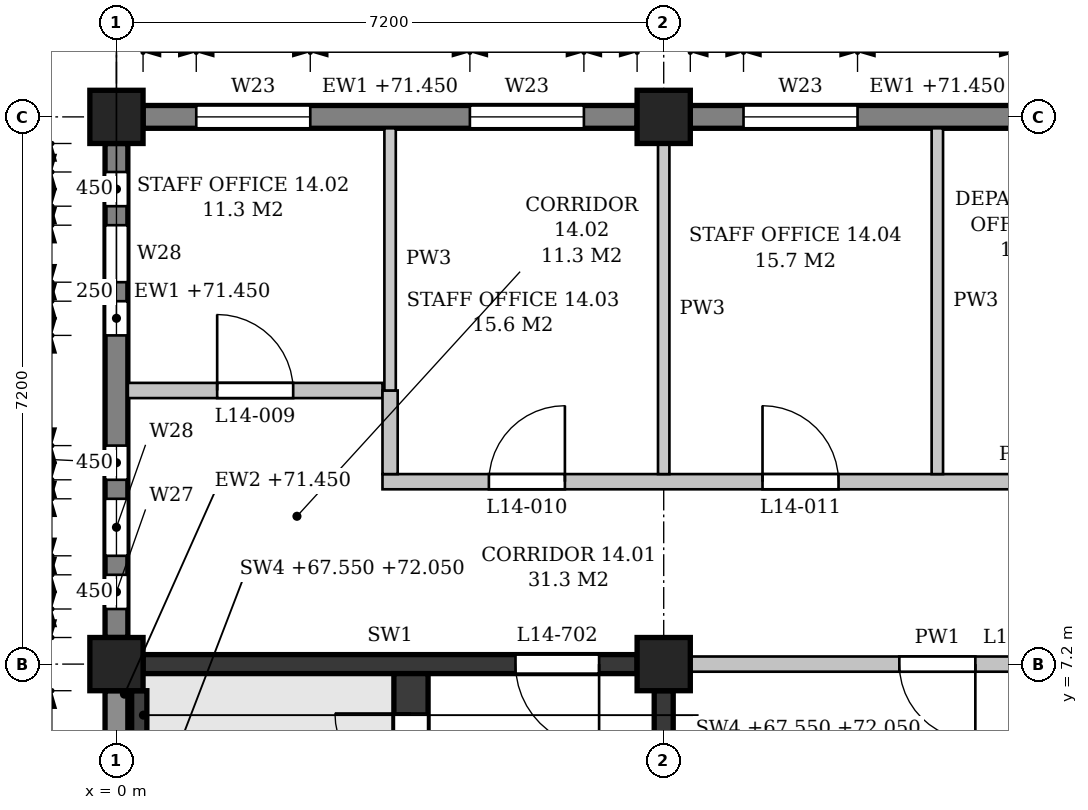
"""IFC4 building model, lengths in metres.
Left out: names, types, materials, properties, quantities, classifications, styles, units other than length and angle.
Written with IfcOpenShell. Run it as: python <this file> out.ifc"""

import sys

from ifc_helpers import new_model, si_unit, direction, frame, frame_2d, origin, origin_2d, place, context, subcontext, project, spatial, polyline, rectangle, outline, extrude, element, fill, save


model = new_model("IFC4")
c1 = context("Model", 3, precision=1e-05, world=origin(), true_north=direction((0.0, 1.0)))
c2 = subcontext(c1, "Body", "Model", "MODEL_VIEW")
j1 = project(units=[si_unit("LENGTHUNIT", "METRE"), si_unit("PLANEANGLEUNIT", "RADIAN")], contexts=[c1])
p1 = place(None, origin())
s1 = spatial("IfcSite", under=j1, at=p1, CompositionType="ELEMENT")
p2 = place(p1, origin())
s2 = spatial("IfcBuilding", under=s1, at=p2, CompositionType="ELEMENT")
p3 = place(p2, frame((0.0, 0.0, 67.8)))
s3 = spatial("IfcBuildingStorey", under=s2, at=p3, CompositionType="ELEMENT", Elevation=67.8)
for number, where, z_axis, x_axis in (
    (1, (0.0, 7.2, 0.0), (0.0, 0.0, 1.0), (1.0, 0.0, 0.0)),
    (2, (0.0, 14.4, 0.0), (0.0, 0.0, 1.0), (1.0, 0.0, 0.0)),
    (3, (7.2, 7.2, 0.0), (0.0, 0.0, 1.0), (1.0, 0.0, 0.0)),
    (4, (7.2, 14.4, 0.0), (0.0, 0.0, 1.0), (1.0, 0.0, 0.0)),
):
    element("IfcColumn", number, at=place(p3, frame(where, z_axis=z_axis, x_axis=x_axis)), inside=s3, PredefinedType="COLUMN", context=c2, shape_type="SweptSolid", body=[
        extrude(rectangle(XDim=0.7, YDim=0.7, at=origin_2d()), origin(), (0.0, 0.0, 1.0), 4.5),
    ])
p4 = place(p3, frame((0.0, 0.35, 0.0), z_axis=(0.0, 0.0, 1.0), x_axis=(0.0, 1.0, 0.0)))
e5 = element("IfcWall", 5, at=p4, inside=s3, PredefinedType="STANDARD", context=c2, shape_type="SweptSolid", body=[
    extrude(rectangle(XDim=6.5, YDim=0.3, at=frame_2d((3.25, 0.0))), origin(), (0.0, 0.0, 1.0), 3.65),
])
p5 = place(p4, frame((1.0, 0.0, 0.9)))
e6 = element("IfcOpeningElement", 6, at=p5, cuts=e5, PredefinedType="OPENING", context=c2, shape_type="SweptSolid", body=[
    extrude(outline(polyline([(0.0, 0.0), (0.9, 0.0), (0.9, 2.25), (0.45, 2.7), (0.0, 2.25), (0.0, 0.0)])), frame((0.0, 0.16, 0.0), z_axis=(0.0, -1.0, 0.0), x_axis=(1.0, 0.0, 0.0)), (0.0, 0.0, 1.0), 0.32),
])
p6 = place(p4, frame((4.6, 0.0, 0.9)))
e7 = element("IfcOpeningElement", 7, at=p6, cuts=e5, PredefinedType="OPENING", context=c2, shape_type="SweptSolid", body=[
    extrude(outline(polyline([(0.0, 0.0), (0.9, 0.0), (0.9, 2.25), (0.45, 2.7), (0.0, 2.25), (0.0, 0.0)])), frame((0.0, 0.16, 0.0), z_axis=(0.0, -1.0, 0.0), x_axis=(1.0, 0.0, 0.0)), (0.0, 0.0, 1.0), 0.32),
])
p7 = place(p3, frame((0.0, 7.55, 0.0), z_axis=(0.0, 0.0, 1.0), x_axis=(0.0, 1.0, 0.0)))
e8 = element("IfcWall", 8, at=p7, inside=s3, PredefinedType="STANDARD", context=c2, shape_type="SweptSolid", body=[
    extrude(rectangle(XDim=6.5, YDim=0.3, at=frame_2d((3.25, 0.0))), origin(), (0.0, 0.0, 1.0), 3.65),
])
p8 = place(p7, frame((0.375, 0.0, 1.5)))
e9 = element("IfcOpeningElement", 9, at=p8, cuts=e8, PredefinedType="OPENING", context=c2, shape_type="SweptSolid", body=[
    extrude(outline(polyline([(0.0, 0.0), (0.45, 0.0), (0.45, 1.85), (0.225, 2.1), (0.0, 1.85), (0.0, 0.0)])), frame((0.0, 0.16, 0.0), z_axis=(0.0, -1.0, 0.0), x_axis=(1.0, 0.0, 0.0)), (0.0, 0.0, 1.0), 0.32),
])
p9 = place(p7, frame((1.075, 0.0, 0.9)))
e10 = element("IfcOpeningElement", 10, at=p9, cuts=e8, PredefinedType="OPENING", context=c2, shape_type="SweptSolid", body=[
    extrude(outline(polyline([(0.0, 0.0), (0.75, 0.0), (0.75, 2.25), (0.375, 2.7), (0.0, 2.25), (0.0, 0.0)])), frame((0.0, 0.16, 0.0), z_axis=(0.0, -1.0, 0.0), x_axis=(1.0, 0.0, 0.0)), (0.0, 0.0, 1.0), 0.32),
])
p10 = place(p7, frame((2.075, 0.0, 1.5)))
e11 = element("IfcOpeningElement", 11, at=p10, cuts=e8, PredefinedType="OPENING", context=c2, shape_type="SweptSolid", body=[
    extrude(outline(polyline([(0.0, 0.0), (0.45, 0.0), (0.45, 1.85), (0.225, 2.1), (0.0, 1.85), (0.0, 0.0)])), frame((0.0, 0.16, 0.0), z_axis=(0.0, -1.0, 0.0), x_axis=(1.0, 0.0, 0.0)), (0.0, 0.0, 1.0), 0.32),
])
p11 = place(p7, frame((3.975, 0.0, 1.5)))
e12 = element("IfcOpeningElement", 12, at=p11, cuts=e8, PredefinedType="OPENING", context=c2, shape_type="SweptSolid", body=[
    extrude(outline(polyline([(0.0, 0.0), (0.45, 0.0), (0.45, 1.85), (0.225, 2.1), (0.0, 1.85), (0.0, 0.0)])), frame((0.0, 0.16, 0.0), z_axis=(0.0, -1.0, 0.0), x_axis=(1.0, 0.0, 0.0)), (0.0, 0.0, 1.0), 0.32),
])
p12 = place(p7, frame((4.675, 0.0, 0.9)))
e13 = element("IfcOpeningElement", 13, at=p12, cuts=e8, PredefinedType="OPENING", context=c2, shape_type="SweptSolid", body=[
    extrude(outline(polyline([(0.0, 0.0), (0.75, 0.0), (0.75, 2.25), (0.375, 2.7), (0.0, 2.25), (0.0, 0.0)])), frame((0.0, 0.16, 0.0), z_axis=(0.0, -1.0, 0.0), x_axis=(1.0, 0.0, 0.0)), (0.0, 0.0, 1.0), 0.32),
])
p13 = place(p7, frame((5.675, 0.0, 1.5)))
e14 = element("IfcOpeningElement", 14, at=p13, cuts=e8, PredefinedType="OPENING", context=c2, shape_type="SweptSolid", body=[
    extrude(outline(polyline([(0.0, 0.0), (0.45, 0.0), (0.45, 1.85), (0.225, 2.1), (0.0, 1.85), (0.0, 0.0)])), frame((0.0, 0.16, 0.0), z_axis=(0.0, -1.0, 0.0), x_axis=(1.0, 0.0, 0.0)), (0.0, 0.0, 1.0), 0.32),
])
p14 = place(p3, frame((14.05, 14.4, 0.0), z_axis=(0.0, 0.0, 1.0), x_axis=(-1.0, 0.0, 0.0)))
e15 = element("IfcWall", 15, at=p14, inside=s3, PredefinedType="STANDARD", context=c2, shape_type="SweptSolid", body=[
    extrude(rectangle(XDim=6.5, YDim=0.3, at=frame_2d((3.25, 0.0))), origin(), (0.0, 0.0, 1.0), 3.65),
])
p15 = place(p14, frame((0.7, 0.0, 0.9)))
e16 = element("IfcOpeningElement", 16, at=p15, cuts=e15, PredefinedType="OPENING", context=c2, shape_type="SweptSolid", body=[
    extrude(outline(polyline([(0.0, 0.0), (1.5, 0.0), (1.5, 1.95), (0.75, 2.7), (0.0, 1.95), (0.0, 0.0)])), frame((0.0, 0.16, 0.0), z_axis=(0.0, -1.0, 0.0), x_axis=(1.0, 0.0, 0.0)), (0.0, 0.0, 1.0), 0.32),
])
p16 = place(p14, frame((4.3, 0.0, 0.9)))
e17 = element("IfcOpeningElement", 17, at=p16, cuts=e15, PredefinedType="OPENING", context=c2, shape_type="SweptSolid", body=[
    extrude(outline(polyline([(0.0, 0.0), (1.5, 0.0), (1.5, 1.95), (0.75, 2.7), (0.0, 1.95), (0.0, 0.0)])), frame((0.0, 0.16, 0.0), z_axis=(0.0, -1.0, 0.0), x_axis=(1.0, 0.0, 0.0)), (0.0, 0.0, 1.0), 0.32),
])
p17 = place(p3, frame((6.85, 14.4, 0.0), z_axis=(0.0, 0.0, 1.0), x_axis=(-1.0, 0.0, 0.0)))
e18 = element("IfcWall", 18, at=p17, inside=s3, PredefinedType="STANDARD", context=c2, shape_type="SweptSolid", body=[
    extrude(rectangle(XDim=6.5, YDim=0.3, at=frame_2d((3.25, 0.0))), origin(), (0.0, 0.0, 1.0), 3.65),
])
p18 = place(p17, frame((0.7, 0.0, 0.9)))
e19 = element("IfcOpeningElement", 19, at=p18, cuts=e18, PredefinedType="OPENING", context=c2, shape_type="SweptSolid", body=[
    extrude(outline(polyline([(0.0, 0.0), (1.5, 0.0), (1.5, 1.95), (0.75, 2.7), (0.0, 1.95), (0.0, 0.0)])), frame((0.0, 0.16, 0.0), z_axis=(0.0, -1.0, 0.0), x_axis=(1.0, 0.0, 0.0)), (0.0, 0.0, 1.0), 0.32),
])
p19 = place(p17, frame((4.3, 0.0, 0.9)))
e20 = element("IfcOpeningElement", 20, at=p19, cuts=e18, PredefinedType="OPENING", context=c2, shape_type="SweptSolid", body=[
    extrude(outline(polyline([(0.0, 0.0), (1.5, 0.0), (1.5, 1.95), (0.75, 2.7), (0.0, 1.95), (0.0, 0.0)])), frame((0.0, 0.16, 0.0), z_axis=(0.0, -1.0, 0.0), x_axis=(1.0, 0.0, 0.0)), (0.0, 0.0, 1.0), 0.32),
])
p20 = place(p3, frame((0.35, 7.2, 0.0), z_axis=(0.0, 0.0, 1.0), x_axis=(1.0, 0.0, 0.0)))
e21 = element("IfcWall", 21, at=p20, inside=s3, PredefinedType="SHEAR", context=c2, shape_type="SweptSolid", body=[
    extrude(rectangle(XDim=6.5, YDim=0.25, at=frame_2d((3.25, 0.0))), origin(), (0.0, 0.0, 1.0), 3.6),
])
p21 = place(p20, frame((4.9, 0.0, 0.0)))
e22 = element("IfcOpeningElement", 22, at=p21, cuts=e21, PredefinedType="OPENING", context=c2, shape_type="SweptSolid", body=[
    extrude(rectangle(XDim=1.1, YDim=2.1, at=frame_2d((0.55, 1.05))), frame((0.0, 0.135, 0.0), z_axis=(0.0, -1.0, 0.0), x_axis=(1.0, 0.0, 0.0)), (0.0, 0.0, 1.0), 0.27),
])
p22 = place(p3, frame((7.2, 0.35, 0.0), z_axis=(0.0, 0.0, 1.0), x_axis=(0.0, 1.0, 0.0)))
e23 = element("IfcWall", 23, at=p22, inside=s3, PredefinedType="SHEAR", context=c2, shape_type="SweptSolid", body=[
    extrude(rectangle(XDim=6.5, YDim=0.25, at=frame_2d((3.25, 0.0))), origin(), (0.0, 0.0, 1.0), 3.6),
])
p23 = place(p3, frame((0.3, 5.85, -0.25), z_axis=(0.0, 0.0, 1.0), x_axis=(0.0, 1.0, 0.0)))
e24 = element("IfcWall", 24, at=p23, inside=s3, PredefinedType="SHEAR", context=c2, shape_type="SweptSolid", body=[
    extrude(rectangle(XDim=1.0, YDim=0.2, at=frame_2d((0.5, 0.0))), origin(), (0.0, 0.0, 1.0), 4.5),
])
p24 = place(p3, frame((3.875, 0.15, 0.0), z_axis=(0.0, 0.0, 1.0), x_axis=(0.0, 1.0, 0.0)))
e25 = element("IfcWall", 25, at=p24, inside=s3, PredefinedType="SHEAR", context=c2, shape_type="SweptSolid", body=[
    extrude(rectangle(XDim=6.925, YDim=0.45, at=frame_2d((3.462, 0.0))), origin(), (0.0, 0.0, 1.0), 4.25),
])
p25 = place(p24, frame((5.4, 0.0, 0.0)))
e26 = element("IfcOpeningElement", 26, at=p25, cuts=e25, PredefinedType="OPENING", context=c2, shape_type="SweptSolid", body=[
    extrude(rectangle(XDim=1.0, YDim=2.1, at=frame_2d((0.5, 1.05))), frame((0.0, 0.235, 0.0), z_axis=(0.0, -1.0, 0.0), x_axis=(1.0, 0.0, 0.0)), (0.0, 0.0, 1.0), 0.47),
])
p26 = place(p3, frame((7.55, 7.2, 0.0), z_axis=(0.0, 0.0, 1.0), x_axis=(1.0, 0.0, 0.0)))
e27 = element("IfcWall", 27, at=p26, inside=s3, PredefinedType="PARTITIONING", context=c2, shape_type="SweptSolid", body=[
    extrude(rectangle(XDim=6.5, YDim=0.2, at=frame_2d((3.25, 0.0))), origin(), (0.0, 0.0, 1.0), 3.6),
])
p27 = place(p26, frame((2.75, 0.0, 0.0)))
e28 = element("IfcOpeningElement", 28, at=p27, cuts=e27, PredefinedType="OPENING", context=c2, shape_type="SweptSolid", body=[
    extrude(rectangle(XDim=1.0, YDim=2.1, at=frame_2d((0.5, 1.05))), frame((0.0, 0.11, 0.0), z_axis=(0.0, -1.0, 0.0), x_axis=(1.0, 0.0, 0.0)), (0.0, 0.0, 1.0), 0.22),
])
p28 = place(p3, frame((3.5, 9.6, 0.0), z_axis=(0.0, 0.0, 1.0), x_axis=(1.0, 0.0, 0.0)))
e29 = element("IfcWall", 29, at=p28, inside=s3, PredefinedType="PARTITIONING", context=c2, shape_type="SweptSolid", body=[
    extrude(outline(polyline([(0.0, 0.0), (18.0, 0.0), (18.0, 3.6), (17.9, 3.6), (17.9, 4.25), (11.1, 4.25), (11.1, 3.6), (10.7, 3.6), (10.7, 4.25), (3.9, 4.25), (3.9, 3.6), (3.5, 3.6), (3.5, 4.25), (0.0, 4.25), (0.0, 0.0)])), frame((0.0, 0.1, 0.0), z_axis=(0.0, -1.0, 0.0), x_axis=(1.0, 0.0, 0.0)), (0.0, 0.0, 1.0), 0.2),
])
p29 = place(p28, frame((15.75, 0.0, 0.0)))
e30 = element("IfcOpeningElement", 30, at=p29, cuts=e29, PredefinedType="OPENING", context=c2, shape_type="SweptSolid", body=[
    extrude(rectangle(XDim=1.0, YDim=2.1, at=frame_2d((0.5, 1.05))), frame((0.0, 0.11, 0.0), z_axis=(0.0, -1.0, 0.0), x_axis=(1.0, 0.0, 0.0)), (0.0, 0.0, 1.0), 0.22),
])
p30 = place(p28, frame((1.4, 0.0, 0.0)))
e31 = element("IfcOpeningElement", 31, at=p30, cuts=e29, PredefinedType="OPENING", context=c2, shape_type="SweptSolid", body=[
    extrude(rectangle(XDim=1.0, YDim=2.1, at=frame_2d((0.5, 1.05))), frame((0.0, 0.11, 0.0), z_axis=(0.0, -1.0, 0.0), x_axis=(1.0, 0.0, 0.0)), (0.0, 0.0, 1.0), 0.22),
])
p31 = place(p28, frame((5.0, 0.0, 0.0)))
e32 = element("IfcOpeningElement", 32, at=p31, cuts=e29, PredefinedType="OPENING", context=c2, shape_type="SweptSolid", body=[
    extrude(rectangle(XDim=1.0, YDim=2.1, at=frame_2d((0.5, 1.05))), frame((0.0, 0.11, 0.0), z_axis=(0.0, -1.0, 0.0), x_axis=(1.0, 0.0, 0.0)), (0.0, 0.0, 1.0), 0.22),
])
p32 = place(p28, frame((8.6, 0.0, 0.0)))
e33 = element("IfcOpeningElement", 33, at=p32, cuts=e29, PredefinedType="OPENING", context=c2, shape_type="SweptSolid", body=[
    extrude(rectangle(XDim=1.0, YDim=2.1, at=frame_2d((0.5, 1.05))), frame((0.0, 0.11, 0.0), z_axis=(0.0, -1.0, 0.0), x_axis=(1.0, 0.0, 0.0)), (0.0, 0.0, 1.0), 0.22),
])
p33 = place(p28, frame((12.2, 0.0, 0.0)))
e34 = element("IfcOpeningElement", 34, at=p33, cuts=e29, PredefinedType="OPENING", context=c2, shape_type="SweptSolid", body=[
    extrude(rectangle(XDim=1.0, YDim=2.1, at=frame_2d((0.5, 1.05))), frame((0.0, 0.11, 0.0), z_axis=(0.0, -1.0, 0.0), x_axis=(1.0, 0.0, 0.0)), (0.0, 0.0, 1.0), 0.22),
])
p34 = place(p3, frame((0.15, 10.8, 0.0), z_axis=(0.0, 0.0, 1.0), x_axis=(1.0, 0.0, 0.0)))
e35 = element("IfcWall", 35, at=p34, inside=s3, PredefinedType="PARTITIONING", context=c2, shape_type="SweptSolid", body=[
    extrude(outline(polyline([(0.0, 0.0), (3.35, 0.0), (3.35, 4.25), (0.05, 4.25), (0.05, 3.65), (0.0, 3.65), (0.0, 0.0)])), frame((0.0, 0.1, 0.0), z_axis=(0.0, -1.0, 0.0), x_axis=(1.0, 0.0, 0.0)), (0.0, 0.0, 1.0), 0.2),
])
p35 = place(p34, frame((1.175, 0.0, 0.0)))
e36 = element("IfcOpeningElement", 36, at=p35, cuts=e35, PredefinedType="OPENING", context=c2, shape_type="SweptSolid", body=[
    extrude(rectangle(XDim=1.0, YDim=2.1, at=frame_2d((0.5, 1.05))), frame((0.0, 0.11, 0.0), z_axis=(0.0, -1.0, 0.0), x_axis=(1.0, 0.0, 0.0)), (0.0, 0.0, 1.0), 0.22),
])
p36 = place(p3, frame((3.6, 9.7, 0.0), z_axis=(0.0, 0.0, 1.0), x_axis=(0.0, 1.0, 0.0)))
e37 = element("IfcWall", 37, at=p36, inside=s3, PredefinedType="PARTITIONING", context=c2, shape_type="SweptSolid", body=[
    extrude(rectangle(XDim=1.1, YDim=0.2, at=frame_2d((0.55, 0.0))), origin(), (0.0, 0.0, 1.0), 4.25),
])
p37 = place(p3, frame((3.6, 10.8, 0.0), z_axis=(0.0, 0.0, 1.0), x_axis=(0.0, 1.0, 0.0)))
e38 = element("IfcWall", 38, at=p37, inside=s3, PredefinedType="PARTITIONING", context=c2, shape_type="SweptSolid", body=[
    extrude(rectangle(XDim=3.45, YDim=0.15, at=frame_2d((1.725, 0.0))), origin(), (0.0, 0.0, 1.0), 3.6),
])
p38 = place(p3, frame((7.2, 9.7, 0.0), z_axis=(0.0, 0.0, 1.0), x_axis=(0.0, 1.0, 0.0)))
e39 = element("IfcWall", 39, at=p38, inside=s3, PredefinedType="PARTITIONING", context=c2, shape_type="SweptSolid", body=[
    extrude(rectangle(XDim=4.35, YDim=0.15, at=frame_2d((2.175, 0.0))), origin(), (0.0, 0.0, 1.0), 3.6),
])
p39 = place(p3, frame((10.8, 9.7, 0.0), z_axis=(0.0, 0.0, 1.0), x_axis=(0.0, 1.0, 0.0)))
e40 = element("IfcWall", 40, at=p39, inside=s3, PredefinedType="PARTITIONING", context=c2, shape_type="SweptSolid", body=[
    extrude(rectangle(XDim=4.55, YDim=0.15, at=frame_2d((2.275, 0.0))), origin(), (0.0, 0.0, 1.0), 3.6),
])
p40 = place(p16, origin())
e41 = element("IfcWindow", 41, at=p40, inside=s3, PartitioningType="SINGLE_PANEL", PredefinedType="WINDOW", context=c2, shape_type="SweptSolid", body=[
    extrude(outline(polyline([(0.0, 0.0), (1.5, 0.0), (1.5, 1.95), (0.75, 2.7), (0.0, 1.95), (0.0, 0.0)])), frame((0.0, 0.03, 0.0), z_axis=(0.0, -1.0, 0.0), x_axis=(1.0, 0.0, 0.0)), (0.0, 0.0, 1.0), 0.06),
])
fill(e17, e41)
p41 = place(p18, origin())
e42 = element("IfcWindow", 42, at=p41, inside=s3, PartitioningType="SINGLE_PANEL", PredefinedType="WINDOW", context=c2, shape_type="SweptSolid", body=[
    extrude(outline(polyline([(0.0, 0.0), (1.5, 0.0), (1.5, 1.95), (0.75, 2.7), (0.0, 1.95), (0.0, 0.0)])), frame((0.0, 0.03, 0.0), z_axis=(0.0, -1.0, 0.0), x_axis=(1.0, 0.0, 0.0)), (0.0, 0.0, 1.0), 0.06),
])
fill(e19, e42)
p42 = place(p19, origin())
e43 = element("IfcWindow", 43, at=p42, inside=s3, PartitioningType="SINGLE_PANEL", PredefinedType="WINDOW", context=c2, shape_type="SweptSolid", body=[
    extrude(outline(polyline([(0.0, 0.0), (1.5, 0.0), (1.5, 1.95), (0.75, 2.7), (0.0, 1.95), (0.0, 0.0)])), frame((0.0, 0.03, 0.0), z_axis=(0.0, -1.0, 0.0), x_axis=(1.0, 0.0, 0.0)), (0.0, 0.0, 1.0), 0.06),
])
fill(e20, e43)
p43 = place(p8, origin())
e44 = element("IfcWindow", 44, at=p43, inside=s3, PartitioningType="SINGLE_PANEL", PredefinedType="WINDOW", context=c2, shape_type="SweptSolid", body=[
    extrude(outline(polyline([(0.0, 0.0), (0.45, 0.0), (0.45, 1.85), (0.225, 2.1), (0.0, 1.85), (0.0, 0.0)])), frame((0.0, 0.03, 0.0), z_axis=(0.0, -1.0, 0.0), x_axis=(1.0, 0.0, 0.0)), (0.0, 0.0, 1.0), 0.06),
])
fill(e9, e44)
p44 = place(p9, origin())
e45 = element("IfcWindow", 45, at=p44, inside=s3, PartitioningType="SINGLE_PANEL", PredefinedType="WINDOW", context=c2, shape_type="SweptSolid", body=[
    extrude(outline(polyline([(0.0, 0.0), (0.75, 0.0), (0.75, 2.25), (0.375, 2.7), (0.0, 2.25), (0.0, 0.0)])), frame((0.0, 0.03, 0.0), z_axis=(0.0, -1.0, 0.0), x_axis=(1.0, 0.0, 0.0)), (0.0, 0.0, 1.0), 0.06),
])
fill(e10, e45)
p45 = place(p10, origin())
e46 = element("IfcWindow", 46, at=p45, inside=s3, PartitioningType="SINGLE_PANEL", PredefinedType="WINDOW", context=c2, shape_type="SweptSolid", body=[
    extrude(outline(polyline([(0.0, 0.0), (0.45, 0.0), (0.45, 1.85), (0.225, 2.1), (0.0, 1.85), (0.0, 0.0)])), frame((0.0, 0.03, 0.0), z_axis=(0.0, -1.0, 0.0), x_axis=(1.0, 0.0, 0.0)), (0.0, 0.0, 1.0), 0.06),
])
fill(e11, e46)
p46 = place(p11, origin())
e47 = element("IfcWindow", 47, at=p46, inside=s3, PartitioningType="SINGLE_PANEL", PredefinedType="WINDOW", context=c2, shape_type="SweptSolid", body=[
    extrude(outline(polyline([(0.0, 0.0), (0.45, 0.0), (0.45, 1.85), (0.225, 2.1), (0.0, 1.85), (0.0, 0.0)])), frame((0.0, 0.03, 0.0), z_axis=(0.0, -1.0, 0.0), x_axis=(1.0, 0.0, 0.0)), (0.0, 0.0, 1.0), 0.06),
])
fill(e12, e47)
p47 = place(p12, origin())
e48 = element("IfcWindow", 48, at=p47, inside=s3, PartitioningType="SINGLE_PANEL", PredefinedType="WINDOW", context=c2, shape_type="SweptSolid", body=[
    extrude(outline(polyline([(0.0, 0.0), (0.75, 0.0), (0.75, 2.25), (0.375, 2.7), (0.0, 2.25), (0.0, 0.0)])), frame((0.0, 0.03, 0.0), z_axis=(0.0, -1.0, 0.0), x_axis=(1.0, 0.0, 0.0)), (0.0, 0.0, 1.0), 0.06),
])
fill(e13, e48)
p48 = place(p13, origin())
e49 = element("IfcWindow", 49, at=p48, inside=s3, PartitioningType="SINGLE_PANEL", PredefinedType="WINDOW", context=c2, shape_type="SweptSolid", body=[
    extrude(outline(polyline([(0.0, 0.0), (0.45, 0.0), (0.45, 1.85), (0.225, 2.1), (0.0, 1.85), (0.0, 0.0)])), frame((0.0, 0.03, 0.0), z_axis=(0.0, -1.0, 0.0), x_axis=(1.0, 0.0, 0.0)), (0.0, 0.0, 1.0), 0.06),
])
fill(e14, e49)
p49 = place(p25, origin())
e50 = element("IfcDoor", 50, at=p49, inside=s3, OperationType="SINGLE_SWING_RIGHT", PredefinedType="DOOR", context=c2, shape_type="SweptSolid", body=[
    extrude(rectangle(XDim=1.0, YDim=2.1, at=frame_2d((0.5, 1.05))), frame((0.0, 0.025, 0.0), z_axis=(0.0, -1.0, 0.0), x_axis=(1.0, 0.0, 0.0)), (0.0, 0.0, 1.0), 0.05),
])
fill(e26, e50)
p50 = place(p21, frame((1.1, 0.0, 0.0), z_axis=(0.0, 0.0, 1.0), x_axis=(-1.0, 0.0, 0.0)))
e51 = element("IfcDoor", 51, at=p50, inside=s3, OperationType="SINGLE_SWING_LEFT", PredefinedType="DOOR", context=c2, shape_type="SweptSolid", body=[
    extrude(rectangle(XDim=1.1, YDim=2.1, at=frame_2d((0.55, 1.05))), frame((0.0, 0.025, 0.0), z_axis=(0.0, -1.0, 0.0), x_axis=(1.0, 0.0, 0.0)), (0.0, 0.0, 1.0), 0.05),
])
fill(e22, e51)
p51 = place(p27, frame((1.0, 0.0, 0.0), z_axis=(0.0, 0.0, 1.0), x_axis=(-1.0, 0.0, 0.0)))
e52 = element("IfcDoor", 52, at=p51, inside=s3, OperationType="SINGLE_SWING_LEFT", PredefinedType="DOOR", context=c2, shape_type="SweptSolid", body=[
    extrude(rectangle(XDim=1.0, YDim=2.1, at=frame_2d((0.5, 1.05))), frame((0.0, 0.025, 0.0), z_axis=(0.0, -1.0, 0.0), x_axis=(1.0, 0.0, 0.0)), (0.0, 0.0, 1.0), 0.05),
])
fill(e28, e52)
p52 = place(p35, origin())
e53 = element("IfcDoor", 53, at=p52, inside=s3, OperationType="SINGLE_SWING_LEFT", PredefinedType="DOOR", context=c2, shape_type="SweptSolid", body=[
    extrude(rectangle(XDim=1.0, YDim=2.1, at=frame_2d((0.5, 1.05))), frame((0.0, 0.025, 0.0), z_axis=(0.0, -1.0, 0.0), x_axis=(1.0, 0.0, 0.0)), (0.0, 0.0, 1.0), 0.05),
])
fill(e36, e53)
p53 = place(p30, origin())
e54 = element("IfcDoor", 54, at=p53, inside=s3, OperationType="SINGLE_SWING_RIGHT", PredefinedType="DOOR", context=c2, shape_type="SweptSolid", body=[
    extrude(rectangle(XDim=1.0, YDim=2.1, at=frame_2d((0.5, 1.05))), frame((0.0, 0.025, 0.0), z_axis=(0.0, -1.0, 0.0), x_axis=(1.0, 0.0, 0.0)), (0.0, 0.0, 1.0), 0.05),
])
fill(e31, e54)
p54 = place(p31, origin())
e55 = element("IfcDoor", 55, at=p54, inside=s3, OperationType="SINGLE_SWING_LEFT", PredefinedType="DOOR", context=c2, shape_type="SweptSolid", body=[
    extrude(rectangle(XDim=1.0, YDim=2.1, at=frame_2d((0.5, 1.05))), frame((0.0, 0.025, 0.0), z_axis=(0.0, -1.0, 0.0), x_axis=(1.0, 0.0, 0.0)), (0.0, 0.0, 1.0), 0.05),
])
fill(e32, e55)
save(model, sys.argv[1])
